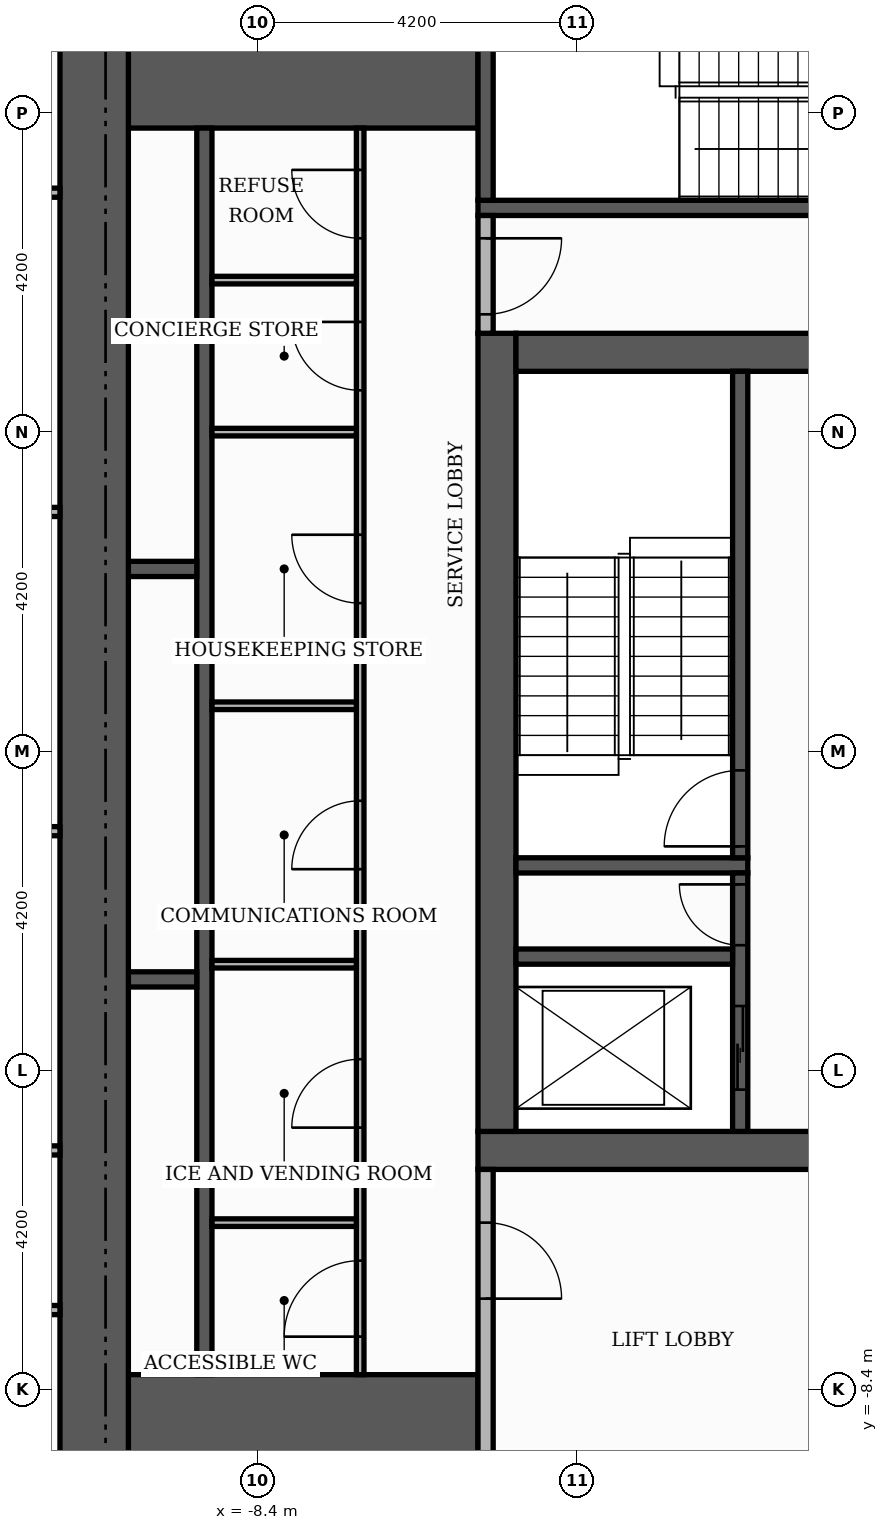
"""IFC4 building model, lengths in metres.
Left out: names, types, materials, properties, quantities, classifications, styles, units other than length and angle.
Written with IfcOpenShell. Run it as: python <this file> out.ifc"""

import sys

from ifc_helpers import new_model, si_unit, direction, frame, frame_2d, origin, place, context, subcontext, project, spatial, rectangle, extrude, element, fill, save


model = new_model("IFC4")
c1 = context("Model", 3, precision=1e-05, world=origin(), true_north=direction((0.0, 1.0)))
c2 = subcontext(c1, "Body", "Model", "MODEL_VIEW")
j1 = project(units=[si_unit("LENGTHUNIT", "METRE"), si_unit("PLANEANGLEUNIT", "RADIAN")], contexts=[c1])
p1 = place(None, origin())
s1 = spatial("IfcSite", under=j1, at=p1, CompositionType="ELEMENT")
p2 = place(p1, origin())
s2 = spatial("IfcBuilding", under=s1, at=p2, CompositionType="ELEMENT")
p3 = place(p2, frame((0.0, 0.0, 153.3)))
s3 = spatial("IfcBuildingStorey", under=s2, at=p3, CompositionType="ELEMENT", Elevation=153.3)
p4 = place(p3, frame((-5.5, -5.25, 0.0), z_axis=(0.0, 0.0, 1.0), x_axis=(1.0, 0.0, 0.0)))
e1 = element("IfcWall", 1, at=p4, inside=s3, PredefinedType="SHEAR", context=c2, shape_type="SweptSolid", body=[
    extrude(rectangle(XDim=11.0, YDim=0.5, at=frame_2d((5.5, 0.0))), origin(), (0.0, 0.0, 1.0), 3.48),
])
p5 = place(p4, frame((4.9, 0.0, 0.0)))
e2 = element("IfcOpeningElement", 2, at=p5, cuts=e1, PredefinedType="OPENING", context=c2, shape_type="SweptSolid", body=[
    extrude(rectangle(XDim=1.2, YDim=2.1, at=frame_2d((0.6, 1.05))), frame((0.0, 0.26, 0.0), z_axis=(0.0, -1.0, 0.0), x_axis=(1.0, 0.0, 0.0)), (0.0, 0.0, 1.0), 0.52),
])
p6 = place(p3, frame((-5.25, -5.0, 0.0), z_axis=(0.0, 0.0, 1.0), x_axis=(0.0, 1.0, 0.0)))
e3 = element("IfcWall", 3, at=p6, inside=s3, PredefinedType="SHEAR", context=c2, shape_type="SweptSolid", body=[
    extrude(rectangle(XDim=10.5, YDim=0.5, at=frame_2d((5.25, 0.0))), origin(), (0.0, 0.0, 1.0), 3.48),
])
p7 = place(p3, frame((-5.0, 5.25, 0.0), z_axis=(0.0, 0.0, 1.0), x_axis=(1.0, 0.0, 0.0)))
e4 = element("IfcWall", 4, at=p7, inside=s3, PredefinedType="SHEAR", context=c2, shape_type="SweptSolid", body=[
    extrude(rectangle(XDim=10.0, YDim=0.5, at=frame_2d((5.0, 0.0))), origin(), (0.0, 0.0, 1.0), 3.48),
])
p8 = place(p7, frame((4.4, 0.0, 0.0)))
e5 = element("IfcOpeningElement", 5, at=p8, cuts=e4, PredefinedType="OPENING", context=c2, shape_type="SweptSolid", body=[
    extrude(rectangle(XDim=1.2, YDim=2.1, at=frame_2d((0.6, 1.05))), frame((0.0, 0.26, 0.0), z_axis=(0.0, -1.0, 0.0), x_axis=(1.0, 0.0, 0.0)), (0.0, 0.0, 1.0), 0.52),
])
for number, where, z_axis, x_axis in (
    (6, (-10.1, -9.15, 0.0), (0.0, 0.0, 1.0), (1.0, 0.0, 0.0)),
    (7, (-10.1, 9.15, 0.0), (0.0, 0.0, 1.0), (1.0, 0.0, 0.0)),
):
    element("IfcWall", number, at=place(p3, frame(where, z_axis=z_axis, x_axis=x_axis)), inside=s3, PredefinedType="SHEAR", context=c2, shape_type="SweptSolid", body=[
        extrude(rectangle(XDim=4.6, YDim=1.9, at=frame_2d((2.3, 0.0))), origin(), (0.0, 0.0, 1.0), 3.48),
    ])
p9 = place(p3, frame((-5.0, -1.5, 0.0), z_axis=(0.0, 0.0, 1.0), x_axis=(1.0, 0.0, 0.0)))
e8 = element("IfcWall", 8, at=p9, inside=s3, PredefinedType="SHEAR", context=c2, shape_type="SweptSolid", body=[
    extrude(rectangle(XDim=3.05, YDim=0.2, at=frame_2d((1.525, 0.0))), origin(), (0.0, 0.0, 1.0), 3.48),
])
p10 = place(p3, frame((-2.05, -1.4, 0.0), z_axis=(0.0, 0.0, 1.0), x_axis=(0.0, 1.0, 0.0)))
e9 = element("IfcWall", 9, at=p10, inside=s3, PredefinedType="SHEAR", context=c2, shape_type="SweptSolid", body=[
    extrude(rectangle(XDim=6.4, YDim=0.2, at=frame_2d((3.2, 0.0))), origin(), (0.0, 0.0, 1.0), 3.48),
])
p11 = place(p10, frame((0.15, 0.0, 0.0)))
e10 = element("IfcOpeningElement", 10, at=p11, cuts=e9, PredefinedType="OPENING", context=c2, shape_type="SweptSolid", body=[
    extrude(rectangle(XDim=1.0, YDim=2.1, at=frame_2d((0.5, 1.05))), frame((0.0, 0.11, 0.0), z_axis=(0.0, -1.0, 0.0), x_axis=(1.0, 0.0, 0.0)), (0.0, 0.0, 1.0), 0.22),
])
p12 = place(p3, frame((-5.5, 7.15, 0.0), z_axis=(0.0, 0.0, 1.0), x_axis=(1.0, 0.0, 0.0)))
e11 = element("IfcWall", 11, at=p12, inside=s3, PredefinedType="SHEAR", context=c2, shape_type="SweptSolid", body=[
    extrude(rectangle(XDim=6.8, YDim=0.2, at=frame_2d((3.4, 0.0))), origin(), (0.0, 0.0, 1.0), 3.48),
])
p13 = place(p3, frame((-5.4, 7.25, 0.0), z_axis=(0.0, 0.0, 1.0), x_axis=(0.0, 1.0, 0.0)))
e12 = element("IfcWall", 12, at=p13, inside=s3, PredefinedType="SHEAR", context=c2, shape_type="SweptSolid", body=[
    extrude(rectangle(XDim=2.85, YDim=0.2, at=frame_2d((1.425, 0.0))), origin(), (0.0, 0.0, 1.0), 3.48),
])
p14 = place(p3, frame((-9.1, -8.2, 0.0), z_axis=(0.0, 0.0, 1.0), x_axis=(0.0, 1.0, 0.0)))
e13 = element("IfcWall", 13, at=p14, inside=s3, PredefinedType="SHEAR", context=c2, shape_type="SweptSolid", body=[
    extrude(rectangle(XDim=16.4, YDim=0.2, at=frame_2d((8.2, 0.0))), origin(), (0.0, 0.0, 1.0), 3.48),
])
p15 = place(p3, frame((-2.05, -5.0, 0.0), z_axis=(0.0, 0.0, 1.0), x_axis=(0.0, 1.0, 0.0)))
e14 = element("IfcWall", 14, at=p15, inside=s3, PredefinedType="SHEAR", context=c2, shape_type="SweptSolid", body=[
    extrude(rectangle(XDim=3.4, YDim=0.2, at=frame_2d((1.7, 0.0))), origin(), (0.0, 0.0, 1.0), 3.48),
])
p16 = place(p15, frame((0.55, 0.0, 0.0)))
e15 = element("IfcOpeningElement", 15, at=p16, cuts=e14, PredefinedType="OPENING", context=c2, shape_type="SweptSolid", body=[
    extrude(rectangle(XDim=1.1, YDim=2.1, at=frame_2d((0.55, 1.05))), frame((0.0, 0.11, 0.0), z_axis=(0.0, -1.0, 0.0), x_axis=(1.0, 0.0, 0.0)), (0.0, 0.0, 1.0), 0.22),
])
p17 = place(p15, frame((2.45, 0.0, 0.0)))
e16 = element("IfcOpeningElement", 16, at=p17, cuts=e14, PredefinedType="OPENING", context=c2, shape_type="SweptSolid", body=[
    extrude(rectangle(XDim=0.8, YDim=2.1, at=frame_2d((0.4, 1.05))), frame((0.0, 0.11, 0.0), z_axis=(0.0, -1.0, 0.0), x_axis=(1.0, 0.0, 0.0)), (0.0, 0.0, 1.0), 0.22),
])
p18 = place(p3, frame((-10.1, -3.0, 0.0), z_axis=(0.0, 0.0, 1.0), x_axis=(1.0, 0.0, 0.0)))
e17 = element("IfcWall", 17, at=p18, inside=s3, PredefinedType="SHEAR", context=c2, shape_type="SweptSolid", body=[
    extrude(rectangle(XDim=0.9, YDim=0.2, at=frame_2d((0.45, 0.0))), origin(), (0.0, 0.0, 1.0), 3.48),
])
p19 = place(p3, frame((-5.0, -2.7, 0.0), z_axis=(0.0, 0.0, 1.0), x_axis=(1.0, 0.0, 0.0)))
e18 = element("IfcWall", 18, at=p19, inside=s3, PredefinedType="SHEAR", context=c2, shape_type="SweptSolid", body=[
    extrude(rectangle(XDim=2.85, YDim=0.2, at=frame_2d((1.425, 0.0))), origin(), (0.0, 0.0, 1.0), 3.48),
])
p20 = place(p3, frame((-10.1, 2.4, 0.0), z_axis=(0.0, 0.0, 1.0), x_axis=(1.0, 0.0, 0.0)))
e19 = element("IfcWall", 19, at=p20, inside=s3, PredefinedType="SHEAR", context=c2, shape_type="SweptSolid", body=[
    extrude(rectangle(XDim=0.9, YDim=0.2, at=frame_2d((0.45, 0.0))), origin(), (0.0, 0.0, 1.0), 3.48),
])
p21 = place(p3, frame((-10.55, -10.1, 0.0), z_axis=(0.0, 0.0, 1.0), x_axis=(0.0, 1.0, 0.0)))
e20 = element("IfcWall", 20, at=p21, inside=s3, PredefinedType="SHEAR", context=c2, shape_type="SweptSolid", body=[
    extrude(rectangle(XDim=20.2, YDim=0.9, at=frame_2d((10.1, 0.0))), origin(), (0.0, 0.0, 1.0), 3.48),
])
p22 = place(p3, frame((-5.4, -10.1, 0.0), z_axis=(0.0, 0.0, 1.0), x_axis=(0.0, 1.0, 0.0)))
e21 = element("IfcWall", 21, at=p22, inside=s3, PredefinedType="PARTITIONING", context=c2, shape_type="SweptSolid", body=[
    extrude(rectangle(XDim=4.6, YDim=0.2, at=frame_2d((2.3, 0.0))), origin(), (0.0, 0.0, 1.0), 3.48),
])
p23 = place(p22, frame((2.9, 0.0, 0.0)))
e22 = element("IfcOpeningElement", 22, at=p23, cuts=e21, PredefinedType="OPENING", context=c2, shape_type="SweptSolid", body=[
    extrude(rectangle(XDim=1.0, YDim=2.1, at=frame_2d((0.5, 1.05))), frame((0.0, 0.11, 0.0), z_axis=(0.0, -1.0, 0.0), x_axis=(1.0, 0.0, 0.0)), (0.0, 0.0, 1.0), 0.22),
])
p24 = place(p3, frame((-7.05, -8.2, 0.0), z_axis=(0.0, 0.0, 1.0), x_axis=(0.0, 1.0, 0.0)))
e23 = element("IfcWall", 23, at=p24, inside=s3, PredefinedType="PARTITIONING", context=c2, shape_type="SweptSolid", body=[
    extrude(rectangle(XDim=16.4, YDim=0.1, at=frame_2d((8.2, 0.0))), origin(), (0.0, 0.0, 1.0), 3.48),
])
p25 = place(p24, frame((0.5, 0.0, 0.0)))
e24 = element("IfcOpeningElement", 24, at=p25, cuts=e23, PredefinedType="OPENING", context=c2, shape_type="SweptSolid", body=[
    extrude(rectangle(XDim=1.0, YDim=2.1, at=frame_2d((0.5, 1.05))), frame((0.0, 0.06, 0.0), z_axis=(0.0, -1.0, 0.0), x_axis=(1.0, 0.0, 0.0)), (0.0, 0.0, 1.0), 0.12),
])
p26 = place(p24, frame((3.25, 0.0, 0.0)))
e25 = element("IfcOpeningElement", 25, at=p26, cuts=e23, PredefinedType="OPENING", context=c2, shape_type="SweptSolid", body=[
    extrude(rectangle(XDim=0.9, YDim=2.1, at=frame_2d((0.45, 1.05))), frame((0.0, 0.06, 0.0), z_axis=(0.0, -1.0, 0.0), x_axis=(1.0, 0.0, 0.0)), (0.0, 0.0, 1.0), 0.12),
])
p27 = place(p24, frame((6.65, 0.0, 0.0)))
e26 = element("IfcOpeningElement", 26, at=p27, cuts=e23, PredefinedType="OPENING", context=c2, shape_type="SweptSolid", body=[
    extrude(rectangle(XDim=0.9, YDim=2.1, at=frame_2d((0.45, 1.05))), frame((0.0, 0.06, 0.0), z_axis=(0.0, -1.0, 0.0), x_axis=(1.0, 0.0, 0.0)), (0.0, 0.0, 1.0), 0.12),
])
p28 = place(p24, frame((10.15, 0.0, 0.0)))
e27 = element("IfcOpeningElement", 27, at=p28, cuts=e23, PredefinedType="OPENING", context=c2, shape_type="SweptSolid", body=[
    extrude(rectangle(XDim=0.9, YDim=2.1, at=frame_2d((0.45, 1.05))), frame((0.0, 0.06, 0.0), z_axis=(0.0, -1.0, 0.0), x_axis=(1.0, 0.0, 0.0)), (0.0, 0.0, 1.0), 0.12),
])
p29 = place(p24, frame((12.95, 0.0, 0.0)))
e28 = element("IfcOpeningElement", 28, at=p29, cuts=e23, PredefinedType="OPENING", context=c2, shape_type="SweptSolid", body=[
    extrude(rectangle(XDim=0.9, YDim=2.1, at=frame_2d((0.45, 1.05))), frame((0.0, 0.06, 0.0), z_axis=(0.0, -1.0, 0.0), x_axis=(1.0, 0.0, 0.0)), (0.0, 0.0, 1.0), 0.12),
])
p30 = place(p24, frame((14.95, 0.0, 0.0)))
e29 = element("IfcOpeningElement", 29, at=p30, cuts=e23, PredefinedType="OPENING", context=c2, shape_type="SweptSolid", body=[
    extrude(rectangle(XDim=0.9, YDim=2.1, at=frame_2d((0.45, 1.05))), frame((0.0, 0.06, 0.0), z_axis=(0.0, -1.0, 0.0), x_axis=(1.0, 0.0, 0.0)), (0.0, 0.0, 1.0), 0.12),
])
for number, where, z_axis, x_axis in (
    (30, (-9.0, -6.2, 0.0), (0.0, 0.0, 1.0), (1.0, 0.0, 0.0)),
    (31, (-9.0, -2.8, 0.0), (0.0, 0.0, 1.0), (1.0, 0.0, 0.0)),
    (32, (-9.0, 0.6, 0.0), (0.0, 0.0, 1.0), (1.0, 0.0, 0.0)),
    (33, (-9.0, 4.2, 0.0), (0.0, 0.0, 1.0), (1.0, 0.0, 0.0)),
):
    element("IfcWall", number, at=place(p3, frame(where, z_axis=z_axis, x_axis=x_axis)), inside=s3, PredefinedType="PARTITIONING", context=c2, shape_type="SweptSolid", body=[
        extrude(rectangle(XDim=1.9, YDim=0.1, at=frame_2d((0.95, 0.0))), origin(), (0.0, 0.0, 1.0), 3.48),
    ])
p31 = place(p3, frame((-5.4, 5.5, 0.0), z_axis=(0.0, 0.0, 1.0), x_axis=(0.0, 1.0, 0.0)))
e34 = element("IfcWall", 34, at=p31, inside=s3, PredefinedType="PARTITIONING", context=c2, shape_type="SweptSolid", body=[
    extrude(rectangle(XDim=1.55, YDim=0.2, at=frame_2d((0.775, 0.0))), origin(), (0.0, 0.0, 1.0), 3.48),
])
p32 = place(p31, frame((0.25, 0.0, 0.0)))
e35 = element("IfcOpeningElement", 35, at=p32, cuts=e34, PredefinedType="OPENING", context=c2, shape_type="SweptSolid", body=[
    extrude(rectangle(XDim=1.0, YDim=2.1, at=frame_2d((0.5, 1.05))), frame((0.0, 0.11, 0.0), z_axis=(0.0, -1.0, 0.0), x_axis=(1.0, 0.0, 0.0)), (0.0, 0.0, 1.0), 0.22),
])
p33 = place(p3, frame((-9.0, 6.2, 0.0), z_axis=(0.0, 0.0, 1.0), x_axis=(1.0, 0.0, 0.0)))
e36 = element("IfcWall", 36, at=p33, inside=s3, PredefinedType="PARTITIONING", context=c2, shape_type="SweptSolid", body=[
    extrude(rectangle(XDim=1.9, YDim=0.1, at=frame_2d((0.95, 0.0))), origin(), (0.0, 0.0, 1.0), 3.48),
])
for number, where, z_axis, x_axis in (
    (37, (-18.62, -7.35, 0.0), (0.0, 0.0, 1.0), (1.0, 0.0, 0.0)),
    (38, (-18.62, -5.25, 0.0), (0.0, 0.0, 1.0), (1.0, 0.0, 0.0)),
    (39, (-18.62, -1.05, 0.0), (0.0, 0.0, 1.0), (1.0, 0.0, 0.0)),
    (40, (-18.62, 3.15, 0.0), (0.0, 0.0, 1.0), (1.0, 0.0, 0.0)),
):
    element("IfcWall", number, at=place(p3, frame(where, z_axis=z_axis, x_axis=x_axis)), inside=s3, PredefinedType="PARTITIONING", context=c2, shape_type="SweptSolid", body=[
        extrude(rectangle(XDim=7.62, YDim=0.12, at=frame_2d((3.81, 0.0))), origin(), (0.0, 0.0, 1.0), 3.48),
    ])
p34 = place(p3, frame((-18.62, 7.35, 0.0), z_axis=(0.0, 0.0, 1.0), x_axis=(1.0, 0.0, 0.0)))
e41 = element("IfcWall", 41, at=p34, inside=s3, PredefinedType="PARTITIONING", context=c2, shape_type="SweptSolid", body=[
    extrude(rectangle(XDim=7.62, YDim=0.12, at=frame_2d((3.81, 0.0))), origin(), (0.0, 0.0, 1.0), 3.48),
])
p35 = place(p34, frame((3.36, 0.0, 0.0)))
e42 = element("IfcOpeningElement", 42, at=p35, cuts=e41, PredefinedType="OPENING", context=c2, shape_type="SweptSolid", body=[
    extrude(rectangle(XDim=0.9, YDim=2.1, at=frame_2d((0.45, 1.05))), frame((0.0, 0.07, 0.0), z_axis=(0.0, -1.0, 0.0), x_axis=(1.0, 0.0, 0.0)), (0.0, 0.0, 1.0), 0.14),
])
p36 = place(p16, origin())
e43 = element("IfcDoor", 43, at=p36, inside=s3, OperationType="SLIDING_TO_LEFT", PredefinedType="DOOR", context=c2, shape_type="SweptSolid", body=[
    extrude(rectangle(XDim=1.1, YDim=2.1, at=frame_2d((0.55, 1.05))), frame((0.0, 0.025, 0.0), z_axis=(0.0, -1.0, 0.0), x_axis=(1.0, 0.0, 0.0)), (0.0, 0.0, 1.0), 0.05),
])
fill(e15, e43)
p37 = place(p11, origin())
e44 = element("IfcDoor", 44, at=p37, inside=s3, OperationType="SINGLE_SWING_LEFT", PredefinedType="DOOR", context=c2, shape_type="SweptSolid", body=[
    extrude(rectangle(XDim=1.0, YDim=2.1, at=frame_2d((0.5, 1.05))), frame((0.0, 0.025, 0.0), z_axis=(0.0, -1.0, 0.0), x_axis=(1.0, 0.0, 0.0)), (0.0, 0.0, 1.0), 0.05),
])
fill(e10, e44)
p38 = place(p17, origin())
e45 = element("IfcDoor", 45, at=p38, inside=s3, OperationType="SINGLE_SWING_RIGHT", PredefinedType="DOOR", context=c2, shape_type="SweptSolid", body=[
    extrude(rectangle(XDim=0.8, YDim=2.1, at=frame_2d((0.4, 1.05))), frame((0.0, 0.025, 0.0), z_axis=(0.0, -1.0, 0.0), x_axis=(1.0, 0.0, 0.0)), (0.0, 0.0, 1.0), 0.05),
])
fill(e16, e45)
p39 = place(p32, frame((1.0, 0.0, 0.0), z_axis=(0.0, 0.0, 1.0), x_axis=(-1.0, 0.0, 0.0)))
e46 = element("IfcDoor", 46, at=p39, inside=s3, OperationType="SINGLE_SWING_RIGHT", PredefinedType="DOOR", context=c2, shape_type="SweptSolid", body=[
    extrude(rectangle(XDim=1.0, YDim=2.1, at=frame_2d((0.5, 1.05))), frame((0.0, 0.025, 0.0), z_axis=(0.0, -1.0, 0.0), x_axis=(1.0, 0.0, 0.0)), (0.0, 0.0, 1.0), 0.05),
])
fill(e35, e46)
p40 = place(p23, frame((1.0, 0.0, 0.0), z_axis=(0.0, 0.0, 1.0), x_axis=(-1.0, 0.0, 0.0)))
e47 = element("IfcDoor", 47, at=p40, inside=s3, OperationType="SINGLE_SWING_LEFT", PredefinedType="DOOR", context=c2, shape_type="SweptSolid", body=[
    extrude(rectangle(XDim=1.0, YDim=2.1, at=frame_2d((0.5, 1.05))), frame((0.0, 0.025, 0.0), z_axis=(0.0, -1.0, 0.0), x_axis=(1.0, 0.0, 0.0)), (0.0, 0.0, 1.0), 0.05),
])
fill(e22, e47)
p41 = place(p25, origin())
e48 = element("IfcDoor", 48, at=p41, inside=s3, OperationType="SINGLE_SWING_LEFT", PredefinedType="DOOR", context=c2, shape_type="SweptSolid", body=[
    extrude(rectangle(XDim=1.0, YDim=2.1, at=frame_2d((0.5, 1.05))), frame((0.0, 0.025, 0.0), z_axis=(0.0, -1.0, 0.0), x_axis=(1.0, 0.0, 0.0)), (0.0, 0.0, 1.0), 0.05),
])
fill(e24, e48)
p42 = place(p26, origin())
e49 = element("IfcDoor", 49, at=p42, inside=s3, OperationType="SINGLE_SWING_LEFT", PredefinedType="DOOR", context=c2, shape_type="SweptSolid", body=[
    extrude(rectangle(XDim=0.9, YDim=2.1, at=frame_2d((0.45, 1.05))), frame((0.0, 0.025, 0.0), z_axis=(0.0, -1.0, 0.0), x_axis=(1.0, 0.0, 0.0)), (0.0, 0.0, 1.0), 0.05),
])
fill(e25, e49)
p43 = place(p27, origin())
e50 = element("IfcDoor", 50, at=p43, inside=s3, OperationType="SINGLE_SWING_LEFT", PredefinedType="DOOR", context=c2, shape_type="SweptSolid", body=[
    extrude(rectangle(XDim=0.9, YDim=2.1, at=frame_2d((0.45, 1.05))), frame((0.0, 0.025, 0.0), z_axis=(0.0, -1.0, 0.0), x_axis=(1.0, 0.0, 0.0)), (0.0, 0.0, 1.0), 0.05),
])
fill(e26, e50)
p44 = place(p28, origin())
e51 = element("IfcDoor", 51, at=p44, inside=s3, OperationType="SINGLE_SWING_RIGHT", PredefinedType="DOOR", context=c2, shape_type="SweptSolid", body=[
    extrude(rectangle(XDim=0.9, YDim=2.1, at=frame_2d((0.45, 1.05))), frame((0.0, 0.025, 0.0), z_axis=(0.0, -1.0, 0.0), x_axis=(1.0, 0.0, 0.0)), (0.0, 0.0, 1.0), 0.05),
])
fill(e27, e51)
p45 = place(p29, origin())
e52 = element("IfcDoor", 52, at=p45, inside=s3, OperationType="SINGLE_SWING_RIGHT", PredefinedType="DOOR", context=c2, shape_type="SweptSolid", body=[
    extrude(rectangle(XDim=0.9, YDim=2.1, at=frame_2d((0.45, 1.05))), frame((0.0, 0.025, 0.0), z_axis=(0.0, -1.0, 0.0), x_axis=(1.0, 0.0, 0.0)), (0.0, 0.0, 1.0), 0.05),
])
fill(e28, e52)
p46 = place(p30, origin())
e53 = element("IfcDoor", 53, at=p46, inside=s3, OperationType="SINGLE_SWING_RIGHT", PredefinedType="DOOR", context=c2, shape_type="SweptSolid", body=[
    extrude(rectangle(XDim=0.9, YDim=2.1, at=frame_2d((0.45, 1.05))), frame((0.0, 0.025, 0.0), z_axis=(0.0, -1.0, 0.0), x_axis=(1.0, 0.0, 0.0)), (0.0, 0.0, 1.0), 0.05),
])
fill(e29, e53)
save(model, sys.argv[1])
